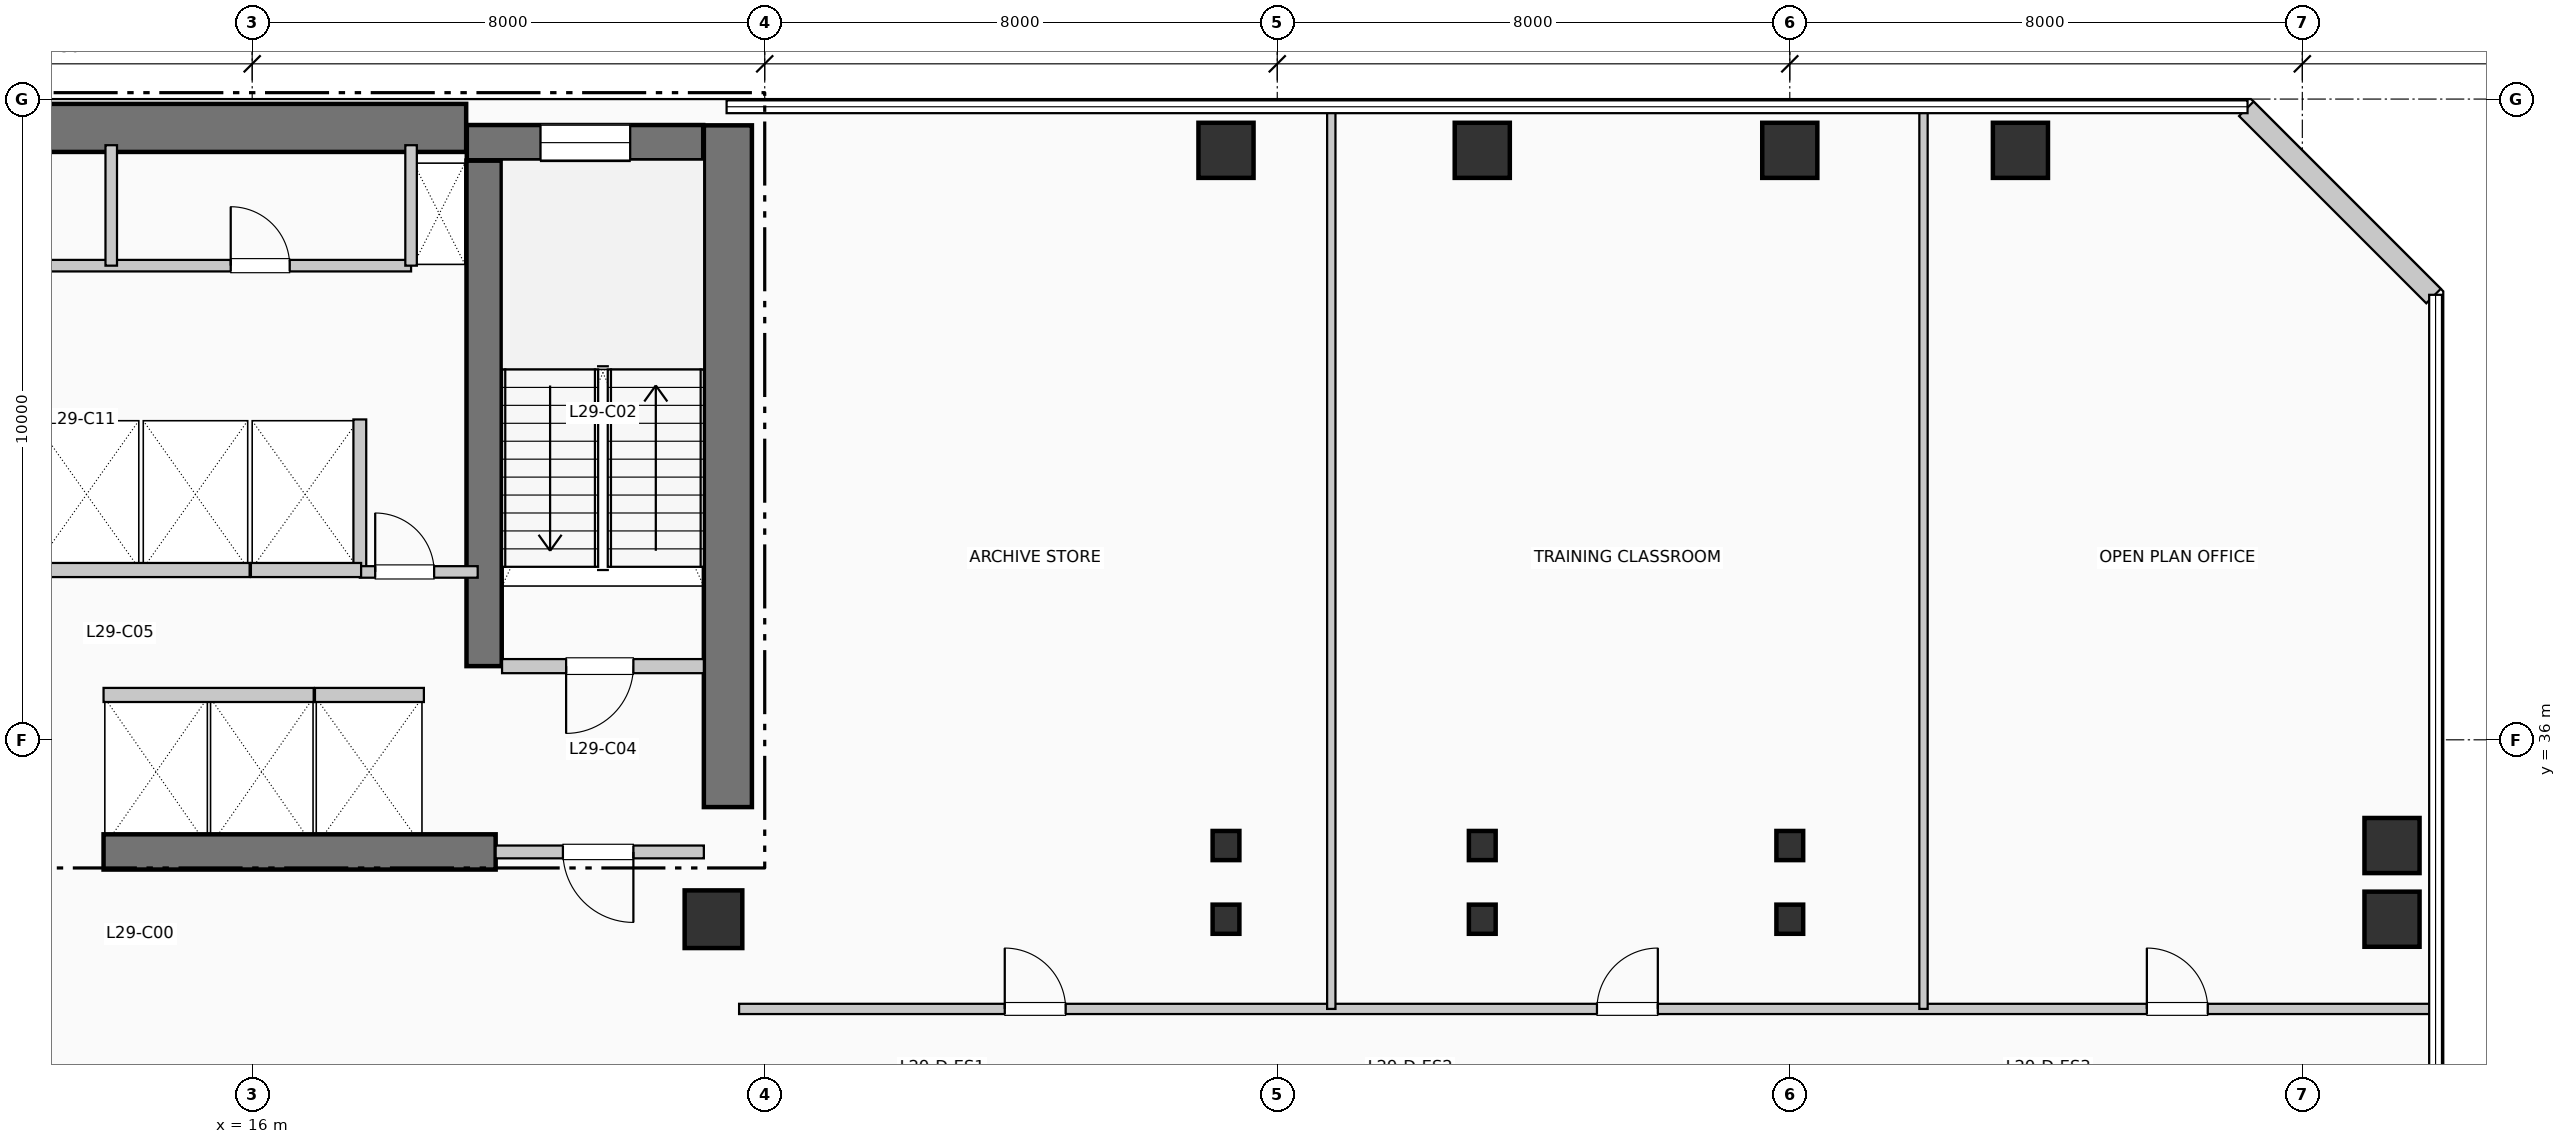
"""IFC4 building model, lengths in metres.
Left out: names, types, materials, properties, quantities, classifications, styles, units other than length and angle.
Written with IfcOpenShell. Run it as: python <this file> out.ifc"""

import sys

from ifc_helpers import new_model, si_unit, direction, frame, frame_2d, origin, origin_2d, place, context, subcontext, project, spatial, rectangle, i_section, extrude, element, fill, save


model = new_model("IFC4")
c1 = context("Model", 3, precision=1e-05, world=origin(), true_north=direction((0.0, 1.0)))
c2 = subcontext(c1, "Body", "Model", "MODEL_VIEW")
j1 = project(units=[si_unit("LENGTHUNIT", "METRE"), si_unit("PLANEANGLEUNIT", "RADIAN")], contexts=[c1])
p1 = place(None, origin())
s1 = spatial("IfcSite", under=j1, at=p1, CompositionType="ELEMENT")
p2 = place(p1, origin())
s2 = spatial("IfcBuilding", under=s1, at=p2, CompositionType="ELEMENT")
p3 = place(p2, frame((0.0, 0.0, 122.43)))
s3 = spatial("IfcBuildingStorey", under=s2, at=p3, CompositionType="ELEMENT", Elevation=122.43)
p4 = place(p3, frame((5.36, 45.55, 0.0), z_axis=(0.0, 0.0, 1.0), x_axis=(1.0, 0.0, 0.0)))
e1 = element("IfcWall", 1, at=p4, inside=s3, PredefinedType="SHEAR", context=c2, shape_type="SweptSolid", body=[
    extrude(rectangle(XDim=13.98, YDim=0.75, at=frame_2d((6.99, 0.0))), origin(), (0.0, 0.0, 1.0), 3.96),
])
p5 = place(p3, frame((23.425, 34.95, 0.0), z_axis=(0.0, 0.0, 1.0), x_axis=(0.0, 1.0, 0.0)))
e2 = element("IfcWall", 2, at=p5, inside=s3, PredefinedType="SHEAR", context=c2, shape_type="SweptSolid", body=[
    extrude(rectangle(XDim=10.64, YDim=0.75, at=frame_2d((5.32, 0.0))), origin(), (0.0, 0.0, 1.0), 3.96),
])
p6 = place(p3, frame((13.68, 34.25, 0.0), z_axis=(0.0, 0.0, 1.0), x_axis=(1.0, 0.0, 0.0)))
e3 = element("IfcWall", 3, at=p6, inside=s3, PredefinedType="SHEAR", context=c2, shape_type="SweptSolid", body=[
    extrude(rectangle(XDim=6.12, YDim=0.55, at=frame_2d((3.06, 0.0))), origin(), (0.0, 0.0, 1.0), 3.96),
])
p7 = place(p3, frame((19.62, 37.15, 0.0), z_axis=(0.0, 0.0, 1.0), x_axis=(0.0, 1.0, 0.0)))
e4 = element("IfcWall", 4, at=p7, inside=s3, PredefinedType="SHEAR", context=c2, shape_type="SweptSolid", body=[
    extrude(rectangle(XDim=7.89, YDim=0.55, at=frame_2d((3.945, 0.0))), origin(), (0.0, 0.0, 1.0), 3.96),
])
p8 = place(p3, frame((19.35, 45.32, 0.0), z_axis=(0.0, 0.0, 1.0), x_axis=(1.0, 0.0, 0.0)))
e5 = element("IfcWall", 5, at=p8, inside=s3, PredefinedType="SHEAR", context=c2, shape_type="SweptSolid", body=[
    extrude(rectangle(XDim=3.69, YDim=0.55, at=frame_2d((1.845, 0.0))), origin(), (0.0, 0.0, 1.0), 3.96),
])
p9 = place(p8, frame((1.15, 0.0, 1.05)))
e6 = element("IfcOpeningElement", 6, at=p9, cuts=e5, PredefinedType="OPENING", context=c2, shape_type="SweptSolid", body=[
    extrude(rectangle(XDim=1.4, YDim=1.8, at=frame_2d((0.7, 0.9))), frame((0.0, 0.285, 0.0), z_axis=(0.0, -1.0, 0.0), x_axis=(1.0, 0.0, 0.0)), (0.0, 0.0, 1.0), 0.57),
])
p10 = place(p3, frame((23.2, 33.2, 0.0), z_axis=(0.0, 0.0, 1.0), x_axis=(1.0, 0.0, 0.0)))
e7 = element("IfcColumn", 7, at=p10, inside=s3, PredefinedType="COLUMN", context=c2, shape_type="SweptSolid", body=[
    extrude(rectangle(XDim=0.9, YDim=0.9, at=origin_2d()), origin(), (0.0, 0.0, 1.0), 3.96),
])
for number, where, z_axis, x_axis in (
    (8, (31.2, 33.2, 0.0), (0.0, 0.0, 1.0), (1.0, 0.0, 0.0)),
    (9, (31.2, 34.35, 0.0), (0.0, 0.0, 1.0), (1.0, 0.0, 0.0)),
):
    element("IfcColumn", number, at=place(p3, frame(where, z_axis=z_axis, x_axis=x_axis)), inside=s3, PredefinedType="COLUMN", context=c2, shape_type="SweptSolid", body=[
        extrude(i_section(OverallWidth=0.418, OverallDepth=0.455, WebThickness=0.032, FlangeThickness=0.051, at=origin_2d()), origin(), (0.0, 0.0, 1.0), 3.96),
    ])
p11 = place(p3, frame((31.2, 45.2, 0.0), z_axis=(0.0, 0.0, 1.0), x_axis=(1.0, 0.0, 0.0)))
e10 = element("IfcColumn", 10, at=p11, inside=s3, PredefinedType="COLUMN", context=c2, shape_type="SweptSolid", body=[
    extrude(rectangle(XDim=0.86, YDim=0.86, at=origin_2d()), origin(), (0.0, 0.0, 1.0), 3.96),
])
for number, where, z_axis, x_axis in (
    (11, (35.2, 33.2, 0.0), (0.0, 0.0, 1.0), (1.0, 0.0, 0.0)),
    (12, (35.2, 34.35, 0.0), (0.0, 0.0, 1.0), (1.0, 0.0, 0.0)),
):
    element("IfcColumn", number, at=place(p3, frame(where, z_axis=z_axis, x_axis=x_axis)), inside=s3, PredefinedType="COLUMN", context=c2, shape_type="SweptSolid", body=[
        extrude(i_section(OverallWidth=0.418, OverallDepth=0.455, WebThickness=0.032, FlangeThickness=0.051, at=origin_2d()), origin(), (0.0, 0.0, 1.0), 3.96),
    ])
p12 = place(p3, frame((35.2, 45.2, 0.0), z_axis=(0.0, 0.0, 1.0), x_axis=(1.0, 0.0, 0.0)))
e13 = element("IfcColumn", 13, at=p12, inside=s3, PredefinedType="COLUMN", context=c2, shape_type="SweptSolid", body=[
    extrude(rectangle(XDim=0.86, YDim=0.86, at=origin_2d()), origin(), (0.0, 0.0, 1.0), 3.96),
])
for number, where, z_axis, x_axis in (
    (14, (40.0, 33.2, 0.0), (0.0, 0.0, 1.0), (1.0, 0.0, 0.0)),
    (15, (40.0, 34.35, 0.0), (0.0, 0.0, 1.0), (1.0, 0.0, 0.0)),
):
    element("IfcColumn", number, at=place(p3, frame(where, z_axis=z_axis, x_axis=x_axis)), inside=s3, PredefinedType="COLUMN", context=c2, shape_type="SweptSolid", body=[
        extrude(i_section(OverallWidth=0.418, OverallDepth=0.455, WebThickness=0.032, FlangeThickness=0.051, at=origin_2d()), origin(), (0.0, 0.0, 1.0), 3.96),
    ])
for number, where, z_axis, x_axis in (
    (16, (40.0, 45.2, 0.0), (0.0, 0.0, 1.0), (1.0, 0.0, 0.0)),
    (17, (43.6, 45.2, 0.0), (0.0, 0.0, 1.0), (1.0, 0.0, 0.0)),
    (18, (49.4, 33.2, 0.0), (0.0, 0.0, 1.0), (1.0, 0.0, 0.0)),
    (19, (49.4, 34.35, 0.0), (0.0, 0.0, 1.0), (1.0, 0.0, 0.0)),
):
    element("IfcColumn", number, at=place(p3, frame(where, z_axis=z_axis, x_axis=x_axis)), inside=s3, PredefinedType="COLUMN", context=c2, shape_type="SweptSolid", body=[
        extrude(rectangle(XDim=0.86, YDim=0.86, at=origin_2d()), origin(), (0.0, 0.0, 1.0), 3.96),
    ])
p13 = place(p3, frame((50.048, 42.926, 0.0), z_axis=(0.0, 0.0, 1.0), x_axis=(-0.707136318428, 0.707077242712, 0.0)))
e20 = element("IfcWall", 20, at=p13, inside=s3, PredefinedType="SOLIDWALL", context=c2, shape_type="SweptSolid", body=[
    extrude(rectangle(XDim=4.133, YDim=0.32, at=frame_2d((2.066, 0.0))), origin(), (0.0, 0.0, 1.0), 3.71),
])
p14 = place(p3, frame((19.9, 37.15, 0.0), z_axis=(0.0, 0.0, 1.0), x_axis=(1.0, 0.0, 0.0)))
e21 = element("IfcWall", 21, at=p14, inside=s3, PredefinedType="PARTITIONING", context=c2, shape_type="SweptSolid", body=[
    extrude(rectangle(XDim=3.15, YDim=0.22, at=frame_2d((1.575, 0.0))), origin(), (0.0, 0.0, 1.0), 3.71),
])
p15 = place(p14, frame((2.05, 0.0, 0.0), z_axis=(0.0, 0.0, 1.0), x_axis=(-1.0, 0.0, 0.0)))
e22 = element("IfcOpeningElement", 22, at=p15, cuts=e21, PredefinedType="OPENING", context=c2, shape_type="SweptSolid", body=[
    extrude(rectangle(XDim=1.05, YDim=2.15, at=frame_2d((0.525, 1.075))), frame((0.0, 0.12, 0.0), z_axis=(0.0, -1.0, 0.0), x_axis=(1.0, 0.0, 0.0)), (0.0, 0.0, 1.0), 0.24),
])
p16 = place(p3, frame((19.8, 34.25, 0.0), z_axis=(0.0, 0.0, 1.0), x_axis=(1.0, 0.0, 0.0)))
e23 = element("IfcWall", 23, at=p16, inside=s3, PredefinedType="PARTITIONING", context=c2, shape_type="SweptSolid", body=[
    extrude(rectangle(XDim=3.25, YDim=0.2, at=frame_2d((1.625, 0.0))), origin(), (0.0, 0.0, 1.0), 3.71),
])
p17 = place(p16, frame((2.15, 0.0, 0.0), z_axis=(0.0, 0.0, 1.0), x_axis=(-1.0, 0.0, 0.0)))
e24 = element("IfcOpeningElement", 24, at=p17, cuts=e23, PredefinedType="OPENING", context=c2, shape_type="SweptSolid", body=[
    extrude(rectangle(XDim=1.1, YDim=2.15, at=frame_2d((0.55, 1.075))), frame((0.0, 0.11, 0.0), z_axis=(0.0, -1.0, 0.0), x_axis=(1.0, 0.0, 0.0)), (0.0, 0.0, 1.0), 0.22),
])
p18 = place(p3, frame((17.68, 38.65, 0.0), z_axis=(0.0, 0.0, 1.0), x_axis=(0.0, 1.0, 0.0)))
e25 = element("IfcWall", 25, at=p18, inside=s3, PredefinedType="PARTITIONING", context=c2, shape_type="SweptSolid", body=[
    extrude(rectangle(XDim=2.35, YDim=0.2, at=frame_2d((1.175, 0.0))), origin(), (0.0, 0.0, 1.0), 3.71),
])
p19 = place(p3, frame((17.68, 38.62, 0.0), z_axis=(0.0, 0.0, 1.0), x_axis=(1.0, 0.0, 0.0)))
e26 = element("IfcWall", 26, at=p19, inside=s3, PredefinedType="PARTITIONING", context=c2, shape_type="SweptSolid", body=[
    extrude(rectangle(XDim=1.84, YDim=0.18, at=frame_2d((0.92, 0.0))), origin(), (0.0, 0.0, 1.0), 3.71),
])
p20 = place(p19, frame((0.24, 0.0, 0.0)))
e27 = element("IfcOpeningElement", 27, at=p20, cuts=e26, PredefinedType="OPENING", context=c2, shape_type="SweptSolid", body=[
    extrude(rectangle(XDim=0.92, YDim=2.1, at=frame_2d((0.46, 1.05))), frame((0.0, 0.1, 0.0), z_axis=(0.0, -1.0, 0.0), x_axis=(1.0, 0.0, 0.0)), (0.0, 0.0, 1.0), 0.2),
])
p21 = place(p3, frame((13.68, 36.7, 0.0), z_axis=(0.0, 0.0, 1.0), x_axis=(1.0, 0.0, 0.0)))
e28 = element("IfcWall", 28, at=p21, inside=s3, PredefinedType="PARTITIONING", context=c2, shape_type="SweptSolid", body=[
    extrude(rectangle(XDim=3.28, YDim=0.22, at=frame_2d((1.64, 0.0))), origin(), (0.0, 0.0, 1.0), 3.71),
])
p22 = place(p3, frame((12.58, 38.65, 0.0), z_axis=(0.0, 0.0, 1.0), x_axis=(1.0, 0.0, 0.0)))
e29 = element("IfcWall", 29, at=p22, inside=s3, PredefinedType="PARTITIONING", context=c2, shape_type="SweptSolid", body=[
    extrude(rectangle(XDim=3.38, YDim=0.22, at=frame_2d((1.69, 0.0))), origin(), (0.0, 0.0, 1.0), 3.71),
])
p23 = place(p3, frame((16.98, 36.7, 0.0), z_axis=(0.0, 0.0, 1.0), x_axis=(1.0, 0.0, 0.0)))
e30 = element("IfcWall", 30, at=p23, inside=s3, PredefinedType="PARTITIONING", context=c2, shape_type="SweptSolid", body=[
    extrude(rectangle(XDim=1.7, YDim=0.22, at=frame_2d((0.85, 0.0))), origin(), (0.0, 0.0, 1.0), 3.71),
])
p24 = place(p3, frame((15.98, 38.65, 0.0), z_axis=(0.0, 0.0, 1.0), x_axis=(1.0, 0.0, 0.0)))
e31 = element("IfcWall", 31, at=p24, inside=s3, PredefinedType="PARTITIONING", context=c2, shape_type="SweptSolid", body=[
    extrude(rectangle(XDim=1.72, YDim=0.22, at=frame_2d((0.86, 0.0))), origin(), (0.0, 0.0, 1.0), 3.71),
])
p25 = place(p3, frame((9.15, 43.4, 0.0), z_axis=(0.0, 0.0, 1.0), x_axis=(1.0, 0.0, 0.0)))
e32 = element("IfcWall", 32, at=p25, inside=s3, PredefinedType="PLUMBINGWALL", context=c2, shape_type="SweptSolid", body=[
    extrude(rectangle(XDim=9.33, YDim=0.18, at=frame_2d((4.665, 0.0))), origin(), (0.0, 0.0, 1.0), 3.71),
])
p26 = place(p25, frame((1.88, 0.0, 0.0)))
e33 = element("IfcOpeningElement", 33, at=p26, cuts=e32, PredefinedType="OPENING", context=c2, shape_type="SweptSolid", body=[
    extrude(rectangle(XDim=0.92, YDim=2.1, at=frame_2d((0.46, 1.05))), frame((0.0, 0.1, 0.0), z_axis=(0.0, -1.0, 0.0), x_axis=(1.0, 0.0, 0.0)), (0.0, 0.0, 1.0), 0.2),
])
p27 = place(p25, frame((6.515, 0.0, 0.0)))
e34 = element("IfcOpeningElement", 34, at=p27, cuts=e32, PredefinedType="OPENING", context=c2, shape_type="SweptSolid", body=[
    extrude(rectangle(XDim=0.92, YDim=2.1, at=frame_2d((0.46, 1.05))), frame((0.0, 0.1, 0.0), z_axis=(0.0, -1.0, 0.0), x_axis=(1.0, 0.0, 0.0)), (0.0, 0.0, 1.0), 0.2),
])
for number, where, z_axis, x_axis in (
    (35, (18.48, 43.4, 0.0), (0.0, 0.0, 1.0), (0.0, 1.0, 0.0)),
    (36, (13.8, 43.4, 0.0), (0.0, 0.0, 1.0), (0.0, 1.0, 0.0)),
):
    element("IfcWall", number, at=place(p3, frame(where, z_axis=z_axis, x_axis=x_axis)), inside=s3, PredefinedType="PLUMBINGWALL", context=c2, shape_type="SweptSolid", body=[
        extrude(rectangle(XDim=1.88, YDim=0.18, at=frame_2d((0.94, 0.0))), origin(), (0.0, 0.0, 1.0), 3.71),
    ])
p28 = place(p3, frame((23.6, 31.8, 0.0), z_axis=(0.0, 0.0, 1.0), x_axis=(1.0, 0.0, 0.0)))
e37 = element("IfcWall", 37, at=p28, inside=s3, PredefinedType="PARTITIONING", context=c2, shape_type="SweptSolid", body=[
    extrude(rectangle(XDim=26.41, YDim=0.16, at=frame_2d((13.205, 0.0))), origin(), (0.0, 0.0, 1.0), 3.71),
])
p29 = place(p28, frame((4.147, 0.0, 0.0)))
e38 = element("IfcOpeningElement", 38, at=p29, cuts=e37, PredefinedType="OPENING", context=c2, shape_type="SweptSolid", body=[
    extrude(rectangle(XDim=0.95, YDim=2.15, at=frame_2d((0.475, 1.075))), frame((0.0, 0.09, 0.0), z_axis=(0.0, -1.0, 0.0), x_axis=(1.0, 0.0, 0.0)), (0.0, 0.0, 1.0), 0.18),
])
p30 = place(p28, frame((13.39, 0.0, 0.0)))
e39 = element("IfcOpeningElement", 39, at=p30, cuts=e37, PredefinedType="OPENING", context=c2, shape_type="SweptSolid", body=[
    extrude(rectangle(XDim=0.95, YDim=2.15, at=frame_2d((0.475, 1.075))), frame((0.0, 0.09, 0.0), z_axis=(0.0, -1.0, 0.0), x_axis=(1.0, 0.0, 0.0)), (0.0, 0.0, 1.0), 0.18),
])
p31 = place(p28, frame((21.973, 0.0, 0.0)))
e40 = element("IfcOpeningElement", 40, at=p31, cuts=e37, PredefinedType="OPENING", context=c2, shape_type="SweptSolid", body=[
    extrude(rectangle(XDim=0.95, YDim=2.15, at=frame_2d((0.475, 1.075))), frame((0.0, 0.09, 0.0), z_axis=(0.0, -1.0, 0.0), x_axis=(1.0, 0.0, 0.0)), (0.0, 0.0, 1.0), 0.18),
])
for number, where, z_axis, x_axis in (
    (41, (32.844, 31.8, 0.0), (0.0, 0.0, 1.0), (0.0, 1.0, 0.0)),
    (42, (42.087, 31.8, 0.0), (0.0, 0.0, 1.0), (0.0, 1.0, 0.0)),
):
    element("IfcWall", number, at=place(p3, frame(where, z_axis=z_axis, x_axis=x_axis)), inside=s3, PredefinedType="PARTITIONING", context=c2, shape_type="SweptSolid", body=[
        extrude(rectangle(XDim=14.01, YDim=0.13, at=frame_2d((7.005, 0.0))), origin(), (0.0, 0.0, 1.0), 3.71),
    ])
p32 = place(p9, origin())
e43 = element("IfcWindow", 43, at=p32, inside=s3, PartitioningType="SINGLE_PANEL", PredefinedType="WINDOW", context=c2, shape_type="SweptSolid", body=[
    extrude(rectangle(XDim=1.4, YDim=1.8, at=frame_2d((0.7, 0.9))), frame((0.0, 0.03, 0.0), z_axis=(0.0, -1.0, 0.0), x_axis=(1.0, 0.0, 0.0)), (0.0, 0.0, 1.0), 0.06),
])
fill(e6, e43)
p33 = place(p15, origin())
e44 = element("IfcDoor", 44, at=p33, inside=s3, OperationType="SINGLE_SWING_LEFT", PredefinedType="DOOR", context=c2, shape_type="SweptSolid", body=[
    extrude(rectangle(XDim=1.05, YDim=2.15, at=frame_2d((0.525, 1.075))), frame((0.0, 0.025, 0.0), z_axis=(0.0, -1.0, 0.0), x_axis=(1.0, 0.0, 0.0)), (0.0, 0.0, 1.0), 0.05),
])
fill(e22, e44)
p34 = place(p17, origin())
e45 = element("IfcDoor", 45, at=p34, inside=s3, OperationType="SINGLE_SWING_RIGHT", PredefinedType="DOOR", context=c2, shape_type="SweptSolid", body=[
    extrude(rectangle(XDim=1.1, YDim=2.15, at=frame_2d((0.55, 1.075))), frame((0.0, 0.025, 0.0), z_axis=(0.0, -1.0, 0.0), x_axis=(1.0, 0.0, 0.0)), (0.0, 0.0, 1.0), 0.05),
])
fill(e24, e45)
p35 = place(p20, origin())
e46 = element("IfcDoor", 46, at=p35, inside=s3, OperationType="SINGLE_SWING_LEFT", PredefinedType="DOOR", context=c2, shape_type="SweptSolid", body=[
    extrude(rectangle(XDim=0.92, YDim=2.1, at=frame_2d((0.46, 1.05))), frame((0.0, 0.025, 0.0), z_axis=(0.0, -1.0, 0.0), x_axis=(1.0, 0.0, 0.0)), (0.0, 0.0, 1.0), 0.05),
])
fill(e27, e46)
p36 = place(p27, origin())
e47 = element("IfcDoor", 47, at=p36, inside=s3, OperationType="SINGLE_SWING_LEFT", PredefinedType="DOOR", context=c2, shape_type="SweptSolid", body=[
    extrude(rectangle(XDim=0.92, YDim=2.1, at=frame_2d((0.46, 1.05))), frame((0.0, 0.025, 0.0), z_axis=(0.0, -1.0, 0.0), x_axis=(1.0, 0.0, 0.0)), (0.0, 0.0, 1.0), 0.05),
])
fill(e34, e47)
p37 = place(p29, origin())
e48 = element("IfcDoor", 48, at=p37, inside=s3, OperationType="SINGLE_SWING_LEFT", PredefinedType="DOOR", context=c2, shape_type="SweptSolid", body=[
    extrude(rectangle(XDim=0.95, YDim=2.15, at=frame_2d((0.475, 1.075))), frame((0.0, 0.025, 0.0), z_axis=(0.0, -1.0, 0.0), x_axis=(1.0, 0.0, 0.0)), (0.0, 0.0, 1.0), 0.05),
])
fill(e38, e48)
p38 = place(p30, origin())
e49 = element("IfcDoor", 49, at=p38, inside=s3, OperationType="SINGLE_SWING_RIGHT", PredefinedType="DOOR", context=c2, shape_type="SweptSolid", body=[
    extrude(rectangle(XDim=0.95, YDim=2.15, at=frame_2d((0.475, 1.075))), frame((0.0, 0.025, 0.0), z_axis=(0.0, -1.0, 0.0), x_axis=(1.0, 0.0, 0.0)), (0.0, 0.0, 1.0), 0.05),
])
fill(e39, e49)
p39 = place(p31, origin())
e50 = element("IfcDoor", 50, at=p39, inside=s3, OperationType="SINGLE_SWING_LEFT", PredefinedType="DOOR", context=c2, shape_type="SweptSolid", body=[
    extrude(rectangle(XDim=0.95, YDim=2.15, at=frame_2d((0.475, 1.075))), frame((0.0, 0.025, 0.0), z_axis=(0.0, -1.0, 0.0), x_axis=(1.0, 0.0, 0.0)), (0.0, 0.0, 1.0), 0.05),
])
fill(e40, e50)
save(model, sys.argv[1])
